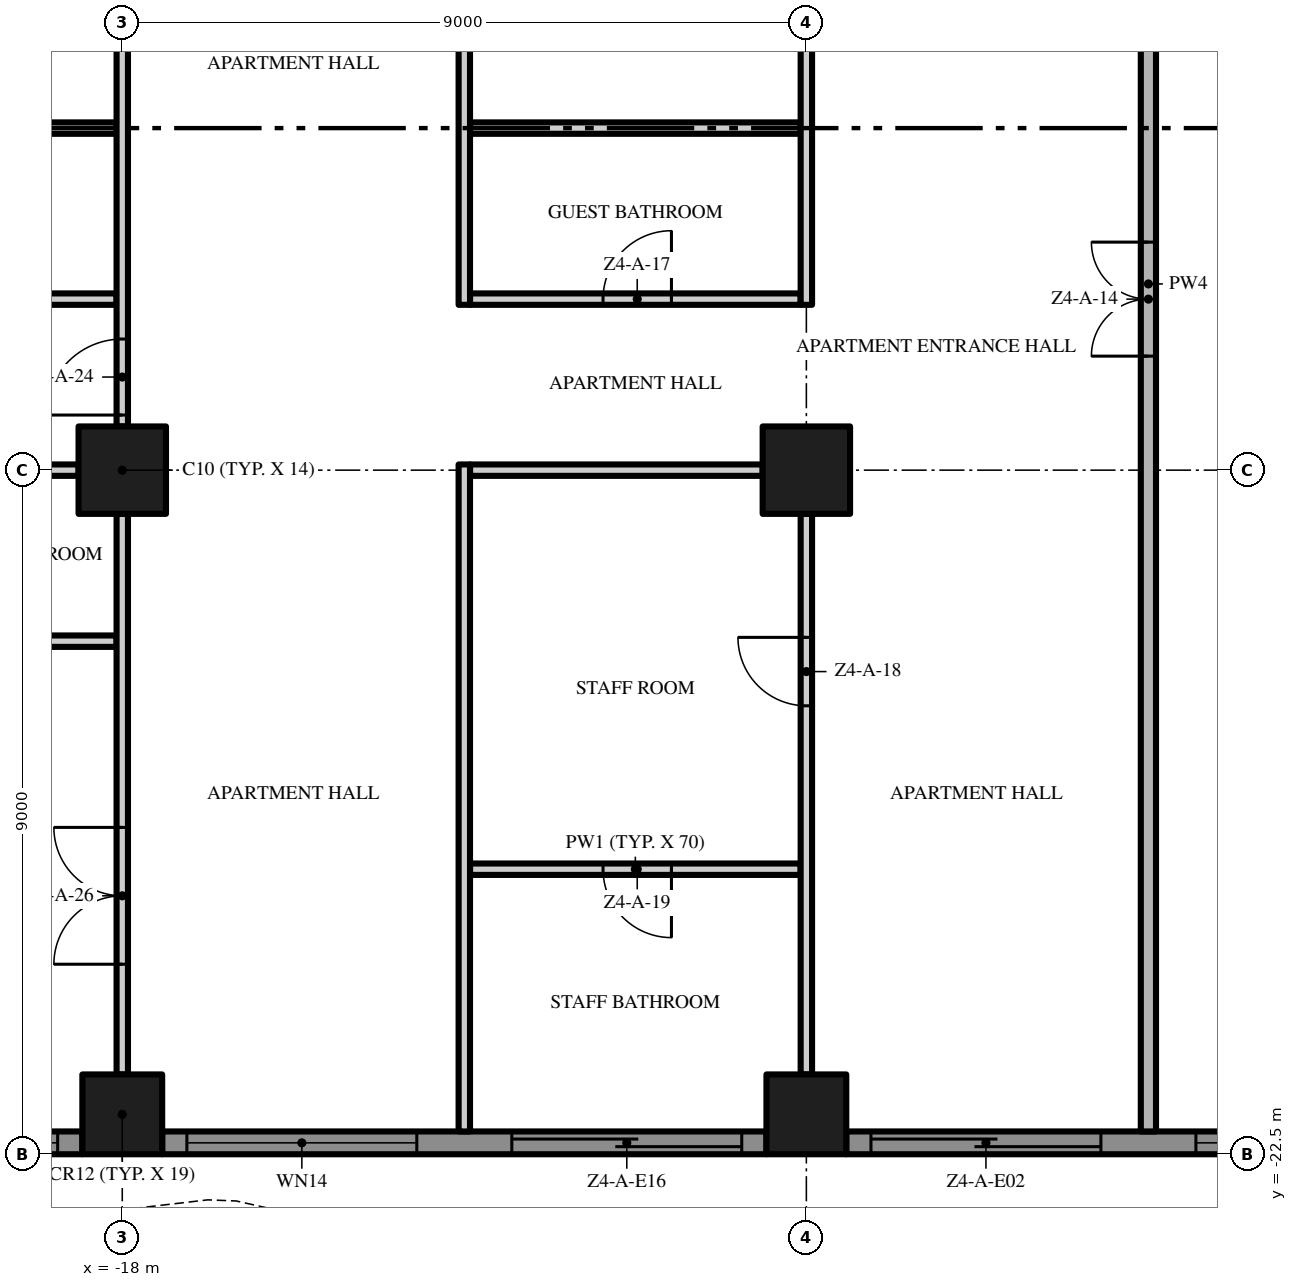
"""IFC4 building model, lengths in metres.
Left out: names, types, materials, properties, quantities, classifications, styles, units other than length and angle.
Written with IfcOpenShell. Run it as: python <this file> out.ifc"""

import sys

from ifc_helpers import new_model, si_unit, direction, frame, frame_2d, origin, origin_2d, place, context, subcontext, project, spatial, polyline, rectangle, outline, extrude, element, fill, save


model = new_model("IFC4")
c1 = context("Model", 3, precision=1e-05, world=origin(), true_north=direction((0.0, 1.0)))
c2 = subcontext(c1, "Body", "Model", "MODEL_VIEW")
j1 = project(units=[si_unit("LENGTHUNIT", "METRE"), si_unit("PLANEANGLEUNIT", "RADIAN")], contexts=[c1])
p1 = place(None, origin())
s1 = spatial("IfcSite", under=j1, at=p1, CompositionType="ELEMENT")
p2 = place(p1, origin())
s2 = spatial("IfcBuilding", under=s1, at=p2, CompositionType="ELEMENT")
p3 = place(p2, frame((0.0, 0.0, 192.0)))
s3 = spatial("IfcBuildingStorey", under=s2, at=p3, CompositionType="ELEMENT", Elevation=192.0)
p4 = place(p3, frame((-18.0, -13.5, 0.0), z_axis=(0.0, 0.0, 1.0), x_axis=(1.0, 0.0, 0.0)))
e1 = element("IfcColumn", 1, at=p4, inside=s3, PredefinedType="COLUMN", context=c2, shape_type="SweptSolid", body=[
    extrude(rectangle(XDim=1.15, YDim=1.15, at=origin_2d()), origin(), (0.0, 0.0, 1.0), 3.5),
])
p5 = place(p3, frame((-18.0, -21.975, 0.0), z_axis=(0.0, 0.0, 1.0), x_axis=(1.0, 0.0, 0.0)))
e2 = element("IfcColumn", 2, at=p5, inside=s3, PredefinedType="COLUMN", context=c2, shape_type="SweptSolid", body=[
    extrude(rectangle(XDim=1.05, YDim=1.05, at=origin_2d()), origin(), (0.0, 0.0, 1.0), 3.5),
])
p6 = place(p3, frame((-9.0, -13.5, 0.0), z_axis=(0.0, 0.0, 1.0), x_axis=(1.0, 0.0, 0.0)))
e3 = element("IfcColumn", 3, at=p6, inside=s3, PredefinedType="COLUMN", context=c2, shape_type="SweptSolid", body=[
    extrude(rectangle(XDim=1.15, YDim=1.15, at=origin_2d()), origin(), (0.0, 0.0, 1.0), 3.5),
])
p7 = place(p3, frame((-9.0, -21.975, 0.0), z_axis=(0.0, 0.0, 1.0), x_axis=(1.0, 0.0, 0.0)))
e4 = element("IfcColumn", 4, at=p7, inside=s3, PredefinedType="COLUMN", context=c2, shape_type="SweptSolid", body=[
    extrude(rectangle(XDim=1.05, YDim=1.05, at=origin_2d()), origin(), (0.0, 0.0, 1.0), 3.5),
])
p8 = place(p3, frame((-18.525, -22.35, 0.0), z_axis=(0.0, 0.0, 1.0), x_axis=(-1.0, 0.0, 0.0)))
e5 = element("IfcWall", 5, at=p8, inside=s3, PredefinedType="SOLIDWALL", context=c2, shape_type="SweptSolid", body=[
    extrude(rectangle(XDim=3.675, YDim=0.3, at=frame_2d((1.837, 0.0))), origin(), (0.0, 0.0, 1.0), 3.5),
])
p9 = place(p8, frame((0.325, 0.0, 0.45)))
e6 = element("IfcOpeningElement", 6, at=p9, cuts=e5, PredefinedType="OPENING", context=c2, shape_type="SweptSolid", body=[
    extrude(rectangle(XDim=3.025, YDim=2.65, at=frame_2d((1.512, 1.325))), frame((0.0, 0.16, 0.0), z_axis=(0.0, -1.0, 0.0), x_axis=(1.0, 0.0, 0.0)), (0.0, 0.0, 1.0), 0.32),
])
p10 = place(p3, frame((-9.525, -22.35, 0.0), z_axis=(0.0, 0.0, 1.0), x_axis=(-1.0, 0.0, 0.0)))
e7 = element("IfcWall", 7, at=p10, inside=s3, PredefinedType="SOLIDWALL", context=c2, shape_type="SweptSolid", body=[
    extrude(rectangle(XDim=7.95, YDim=0.3, at=frame_2d((3.975, 0.0))), origin(), (0.0, 0.0, 1.0), 3.5),
])
p11 = place(p10, frame((4.6, 0.0, 0.45)))
e8 = element("IfcOpeningElement", 8, at=p11, cuts=e7, PredefinedType="OPENING", context=c2, shape_type="SweptSolid", body=[
    extrude(rectangle(XDim=3.025, YDim=2.65, at=frame_2d((1.512, 1.325))), frame((0.0, 0.16, 0.0), z_axis=(0.0, -1.0, 0.0), x_axis=(1.0, 0.0, 0.0)), (0.0, 0.0, 1.0), 0.32),
])
p12 = place(p10, frame((0.325, 0.0, 0.0)))
e9 = element("IfcOpeningElement", 9, at=p12, cuts=e7, PredefinedType="OPENING", context=c2, shape_type="SweptSolid", body=[
    extrude(rectangle(XDim=3.025, YDim=2.4, at=frame_2d((1.512, 1.2))), frame((0.0, 0.16, 0.0), z_axis=(0.0, -1.0, 0.0), x_axis=(1.0, 0.0, 0.0)), (0.0, 0.0, 1.0), 0.32),
])
p13 = place(p3, frame((-0.525, -22.35, 0.0), z_axis=(0.0, 0.0, 1.0), x_axis=(-1.0, 0.0, 0.0)))
e10 = element("IfcWall", 10, at=p13, inside=s3, PredefinedType="SOLIDWALL", context=c2, shape_type="SweptSolid", body=[
    extrude(rectangle(XDim=7.95, YDim=0.3, at=frame_2d((3.975, 0.0))), origin(), (0.0, 0.0, 1.0), 3.5),
])
p14 = place(p13, frame((4.6, 0.0, 0.0)))
e11 = element("IfcOpeningElement", 11, at=p14, cuts=e10, PredefinedType="OPENING", context=c2, shape_type="SweptSolid", body=[
    extrude(rectangle(XDim=3.025, YDim=2.4, at=frame_2d((1.512, 1.2))), frame((0.0, 0.16, 0.0), z_axis=(0.0, -1.0, 0.0), x_axis=(1.0, 0.0, 0.0)), (0.0, 0.0, 1.0), 0.32),
])
p15 = place(p13, frame((0.325, 0.0, 0.45)))
e12 = element("IfcOpeningElement", 12, at=p15, cuts=e10, PredefinedType="OPENING", context=c2, shape_type="SweptSolid", body=[
    extrude(rectangle(XDim=3.025, YDim=2.65, at=frame_2d((1.512, 1.325))), frame((0.0, 0.16, 0.0), z_axis=(0.0, -1.0, 0.0), x_axis=(1.0, 0.0, 0.0)), (0.0, 0.0, 1.0), 0.32),
])
p16 = place(p3, origin())
e13 = element("IfcWall", 13, at=p16, inside=s3, PredefinedType="USERDEFINED", context=c2, shape_type="SweptSolid", body=[
    extrude(outline(polyline([(-22.5, -25.149), (-21.0, -24.488), (-19.5, -23.755), (-18.0, -23.231), (-16.875, -23.1), (-16.5, -23.115), (-15.0, -23.451), (-13.5, -24.112), (-12.0, -24.845), (-10.5, -25.369), (-9.375, -25.5), (-9.0, -25.485), (-7.5, -25.149), (-6.0, -24.488), (-4.5, -23.755), (-3.0, -23.231), (-1.875, -23.1), (-1.5, -23.115), (0.0, -23.451), (1.5, -24.112), (3.0, -24.845), (4.5, -25.369), (5.625, -25.5), (6.0, -25.485), (7.5, -25.149), (9.0, -24.488), (10.5, -23.755), (12.0, -23.231), (13.125, -23.1), (13.5, -23.115), (15.0, -23.451), (16.5, -24.112), (18.0, -24.845), (19.5, -25.369), (20.625, -25.5), (21.0, -25.485), (22.5, -25.149), (22.445, -24.905), (20.967, -25.236), (20.635, -25.249), (19.556, -25.124), (18.096, -24.614), (16.605, -23.885), (15.079, -23.213), (13.533, -22.866), (13.115, -22.849), (11.944, -22.986), (10.404, -23.524), (8.895, -24.261), (7.421, -24.91), (5.967, -25.236), (5.635, -25.249), (4.556, -25.124), (3.096, -24.614), (1.605, -23.885), (0.079, -23.213), (-1.467, -22.866), (-1.885, -22.849), (-3.056, -22.986), (-4.596, -23.524), (-6.105, -24.261), (-7.579, -24.91), (-9.033, -25.236), (-9.365, -25.249), (-10.444, -25.124), (-11.904, -24.614), (-13.395, -23.885), (-14.921, -23.213), (-16.467, -22.866), (-16.885, -22.849), (-18.056, -22.986), (-19.596, -23.524), (-21.105, -24.261), (-22.601, -24.92), (-22.5, -25.149)])), origin(), (0.0, 0.0, 1.0), 0.9),
])
p17 = place(p3, frame((-9.075, -18.75, 0.0), z_axis=(0.0, 0.0, 1.0), x_axis=(-1.0, 0.0, 0.0)))
e14 = element("IfcWall", 14, at=p17, inside=s3, PredefinedType="PARTITIONING", context=c2, shape_type="SweptSolid", body=[
    extrude(rectangle(XDim=4.35, YDim=0.15, at=frame_2d((2.175, 0.0))), origin(), (0.0, 0.0, 1.0), 3.5),
])
p18 = place(p17, frame((1.7, 0.0, 0.0)))
e15 = element("IfcOpeningElement", 15, at=p18, cuts=e14, PredefinedType="OPENING", context=c2, shape_type="SweptSolid", body=[
    extrude(rectangle(XDim=0.9, YDim=2.1, at=frame_2d((0.45, 1.05))), frame((0.0, 0.085, 0.0), z_axis=(0.0, -1.0, 0.0), x_axis=(1.0, 0.0, 0.0)), (0.0, 0.0, 1.0), 0.17),
])
p19 = place(p3, frame((-20.925, -15.75, 0.0), z_axis=(0.0, 0.0, 1.0), x_axis=(1.0, 0.0, 0.0)))
e16 = element("IfcWall", 16, at=p19, inside=s3, PredefinedType="PARTITIONING", context=c2, shape_type="SweptSolid", body=[
    extrude(rectangle(XDim=2.85, YDim=0.15, at=frame_2d((1.425, 0.0))), origin(), (0.0, 0.0, 1.0), 3.5),
])
p20 = place(p3, frame((-25.95, -13.5, 0.0), z_axis=(0.0, 0.0, 1.0), x_axis=(1.0, 0.0, 0.0)))
e17 = element("IfcWall", 17, at=p20, inside=s3, PredefinedType="PARTITIONING", context=c2, shape_type="SweptSolid", body=[
    extrude(rectangle(XDim=7.375, YDim=0.15, at=frame_2d((3.688, 0.0))), origin(), (0.0, 0.0, 1.0), 3.5),
])
p21 = place(p3, frame((-13.425, -13.5, 0.0), z_axis=(0.0, 0.0, 1.0), x_axis=(1.0, 0.0, 0.0)))
e18 = element("IfcWall", 18, at=p21, inside=s3, PredefinedType="PARTITIONING", context=c2, shape_type="SweptSolid", body=[
    extrude(rectangle(XDim=3.85, YDim=0.15, at=frame_2d((1.925, 0.0))), origin(), (0.0, 0.0, 1.0), 3.5),
])
p22 = place(p3, frame((-20.925, -11.25, 0.0), z_axis=(0.0, 0.0, 1.0), x_axis=(1.0, 0.0, 0.0)))
e19 = element("IfcWall", 19, at=p22, inside=s3, PredefinedType="PARTITIONING", context=c2, shape_type="SweptSolid", body=[
    extrude(rectangle(XDim=2.85, YDim=0.15, at=frame_2d((1.425, 0.0))), origin(), (0.0, 0.0, 1.0), 3.5),
])
p23 = place(p3, frame((-13.425, -11.25, 0.0), z_axis=(0.0, 0.0, 1.0), x_axis=(1.0, 0.0, 0.0)))
e20 = element("IfcWall", 20, at=p23, inside=s3, PredefinedType="PARTITIONING", context=c2, shape_type="SweptSolid", body=[
    extrude(rectangle(XDim=4.35, YDim=0.15, at=frame_2d((2.175, 0.0))), origin(), (0.0, 0.0, 1.0), 3.5),
])
p24 = place(p23, frame((1.75, 0.0, 0.0)))
e21 = element("IfcOpeningElement", 21, at=p24, cuts=e20, PredefinedType="OPENING", context=c2, shape_type="SweptSolid", body=[
    extrude(rectangle(XDim=0.9, YDim=2.1, at=frame_2d((0.45, 1.05))), frame((0.0, 0.085, 0.0), z_axis=(0.0, -1.0, 0.0), x_axis=(1.0, 0.0, 0.0)), (0.0, 0.0, 1.0), 0.17),
])
p25 = place(p3, frame((-20.925, -9.0, 0.0), z_axis=(0.0, 0.0, 1.0), x_axis=(1.0, 0.0, 0.0)))
e22 = element("IfcWall", 22, at=p25, inside=s3, PredefinedType="PARTITIONING", context=c2, shape_type="SweptSolid", body=[
    extrude(rectangle(XDim=2.85, YDim=0.15, at=frame_2d((1.425, 0.0))), origin(), (0.0, 0.0, 1.0), 3.5),
])
p26 = place(p3, frame((-13.425, -9.0, 0.0), z_axis=(0.0, 0.0, 1.0), x_axis=(1.0, 0.0, 0.0)))
e23 = element("IfcWall", 23, at=p26, inside=s3, PredefinedType="PARTITIONING", context=c2, shape_type="SweptSolid", body=[
    extrude(rectangle(XDim=4.35, YDim=0.15, at=frame_2d((2.175, 0.0))), origin(), (0.0, 0.0, 1.0), 3.5),
])
p27 = place(p3, frame((-18.0, -21.45, 0.0), z_axis=(0.0, 0.0, 1.0), x_axis=(0.0, 1.0, 0.0)))
e24 = element("IfcWall", 24, at=p27, inside=s3, PredefinedType="PARTITIONING", context=c2, shape_type="SweptSolid", body=[
    extrude(rectangle(XDim=7.375, YDim=0.15, at=frame_2d((3.688, 0.0))), origin(), (0.0, 0.0, 1.0), 3.5),
])
p28 = place(p27, frame((1.45, 0.0, 0.0)))
e25 = element("IfcOpeningElement", 25, at=p28, cuts=e24, PredefinedType="OPENING", context=c2, shape_type="SweptSolid", body=[
    extrude(rectangle(XDim=1.8, YDim=2.4, at=frame_2d((0.9, 1.2))), frame((0.0, 0.085, 0.0), z_axis=(0.0, -1.0, 0.0), x_axis=(1.0, 0.0, 0.0)), (0.0, 0.0, 1.0), 0.17),
])
p29 = place(p3, frame((-18.0, -12.925, 0.0), z_axis=(0.0, 0.0, 1.0), x_axis=(0.0, 1.0, 0.0)))
e26 = element("IfcWall", 26, at=p29, inside=s3, PredefinedType="PARTITIONING", context=c2, shape_type="SweptSolid", body=[
    extrude(rectangle(XDim=7.85, YDim=0.15, at=frame_2d((3.925, 0.0))), origin(), (0.0, 0.0, 1.0), 3.5),
])
p30 = place(p29, frame((6.7, 0.0, 0.0)))
e27 = element("IfcOpeningElement", 27, at=p30, cuts=e26, PredefinedType="OPENING", context=c2, shape_type="SweptSolid", body=[
    extrude(rectangle(XDim=1.0, YDim=2.4, at=frame_2d((0.5, 1.2))), frame((0.0, 0.085, 0.0), z_axis=(0.0, -1.0, 0.0), x_axis=(1.0, 0.0, 0.0)), (0.0, 0.0, 1.0), 0.17),
])
p31 = place(p29, frame((0.15, 0.0, 0.0)))
e28 = element("IfcOpeningElement", 28, at=p31, cuts=e26, PredefinedType="OPENING", context=c2, shape_type="SweptSolid", body=[
    extrude(rectangle(XDim=1.0, YDim=2.4, at=frame_2d((0.5, 1.2))), frame((0.0, 0.085, 0.0), z_axis=(0.0, -1.0, 0.0), x_axis=(1.0, 0.0, 0.0)), (0.0, 0.0, 1.0), 0.17),
])
p32 = place(p3, frame((-13.5, -22.2, 0.0), z_axis=(0.0, 0.0, 1.0), x_axis=(0.0, 1.0, 0.0)))
e29 = element("IfcWall", 29, at=p32, inside=s3, PredefinedType="PARTITIONING", context=c2, shape_type="SweptSolid", body=[
    extrude(rectangle(XDim=8.775, YDim=0.15, at=frame_2d((4.388, 0.0))), origin(), (0.0, 0.0, 1.0), 3.5),
])
p33 = place(p3, frame((-13.5, -11.325, 0.0), z_axis=(0.0, 0.0, 1.0), x_axis=(0.0, 1.0, 0.0)))
e30 = element("IfcWall", 30, at=p33, inside=s3, PredefinedType="PARTITIONING", context=c2, shape_type="SweptSolid", body=[
    extrude(rectangle(XDim=11.225, YDim=0.15, at=frame_2d((5.612, 0.0))), origin(), (0.0, 0.0, 1.0), 3.5),
])
p34 = place(p3, frame((-9.0, -21.45, 0.0), z_axis=(0.0, 0.0, 1.0), x_axis=(0.0, 1.0, 0.0)))
e31 = element("IfcWall", 31, at=p34, inside=s3, PredefinedType="PARTITIONING", context=c2, shape_type="SweptSolid", body=[
    extrude(rectangle(XDim=7.375, YDim=0.15, at=frame_2d((3.688, 0.0))), origin(), (0.0, 0.0, 1.0), 3.5),
])
p35 = place(p34, frame((4.85, 0.0, 0.0)))
e32 = element("IfcOpeningElement", 32, at=p35, cuts=e31, PredefinedType="OPENING", context=c2, shape_type="SweptSolid", body=[
    extrude(rectangle(XDim=0.9, YDim=2.1, at=frame_2d((0.45, 1.05))), frame((0.0, 0.085, 0.0), z_axis=(0.0, -1.0, 0.0), x_axis=(1.0, 0.0, 0.0)), (0.0, 0.0, 1.0), 0.17),
])
p36 = place(p3, frame((-9.0, -11.325, 0.0), z_axis=(0.0, 0.0, 1.0), x_axis=(0.0, 1.0, 0.0)))
e33 = element("IfcWall", 33, at=p36, inside=s3, PredefinedType="PARTITIONING", context=c2, shape_type="SweptSolid", body=[
    extrude(rectangle(XDim=6.25, YDim=0.15, at=frame_2d((3.125, 0.0))), origin(), (0.0, 0.0, 1.0), 3.5),
])
p37 = place(p36, frame((4.825, 0.0, 0.0)))
e34 = element("IfcOpeningElement", 34, at=p37, cuts=e33, PredefinedType="OPENING", context=c2, shape_type="SweptSolid", body=[
    extrude(rectangle(XDim=1.0, YDim=2.4, at=frame_2d((0.5, 1.2))), frame((0.0, 0.085, 0.0), z_axis=(0.0, -1.0, 0.0), x_axis=(1.0, 0.0, 0.0)), (0.0, 0.0, 1.0), 0.17),
])
p38 = place(p3, frame((-4.5, -22.2, 0.0), z_axis=(0.0, 0.0, 1.0), x_axis=(0.0, 1.0, 0.0)))
e35 = element("IfcWall", 35, at=p38, inside=s3, PredefinedType="PARTITIONING", context=c2, shape_type="SweptSolid", body=[
    extrude(rectangle(XDim=22.3, YDim=0.2, at=frame_2d((11.15, 0.0))), origin(), (0.0, 0.0, 1.0), 3.5),
])
p39 = place(p38, frame((10.2, 0.0, 0.0)))
e36 = element("IfcOpeningElement", 36, at=p39, cuts=e35, PredefinedType="OPENING", context=c2, shape_type="SweptSolid", body=[
    extrude(rectangle(XDim=1.5, YDim=2.4, at=frame_2d((0.75, 1.2))), frame((0.0, 0.11, 0.0), z_axis=(0.0, -1.0, 0.0), x_axis=(1.0, 0.0, 0.0)), (0.0, 0.0, 1.0), 0.22),
])
p40 = place(p9, origin())
e37 = element("IfcWindow", 37, at=p40, inside=s3, PartitioningType="SINGLE_PANEL", PredefinedType="WINDOW", context=c2, shape_type="SweptSolid", body=[
    extrude(rectangle(XDim=3.025, YDim=2.65, at=frame_2d((1.512, 1.325))), frame((0.0, 0.03, 0.0), z_axis=(0.0, -1.0, 0.0), x_axis=(1.0, 0.0, 0.0)), (0.0, 0.0, 1.0), 0.06),
])
fill(e6, e37)
p41 = place(p11, origin())
e38 = element("IfcWindow", 38, at=p41, inside=s3, PartitioningType="SINGLE_PANEL", PredefinedType="WINDOW", context=c2, shape_type="SweptSolid", body=[
    extrude(rectangle(XDim=3.025, YDim=2.65, at=frame_2d((1.512, 1.325))), frame((0.0, 0.03, 0.0), z_axis=(0.0, -1.0, 0.0), x_axis=(1.0, 0.0, 0.0)), (0.0, 0.0, 1.0), 0.06),
])
fill(e8, e38)
p42 = place(p12, origin())
e39 = element("IfcDoor", 39, at=p42, inside=s3, OperationType="SINGLE_SWING_LEFT", PredefinedType="DOOR", context=c2, shape_type="SweptSolid", body=[
    extrude(rectangle(XDim=3.025, YDim=2.4, at=frame_2d((1.512, 1.2))), frame((0.0, 0.025, 0.0), z_axis=(0.0, -1.0, 0.0), x_axis=(1.0, 0.0, 0.0)), (0.0, 0.0, 1.0), 0.05),
])
fill(e9, e39)
p43 = place(p14, origin())
e40 = element("IfcDoor", 40, at=p43, inside=s3, OperationType="SINGLE_SWING_LEFT", PredefinedType="DOOR", context=c2, shape_type="SweptSolid", body=[
    extrude(rectangle(XDim=3.025, YDim=2.4, at=frame_2d((1.512, 1.2))), frame((0.0, 0.025, 0.0), z_axis=(0.0, -1.0, 0.0), x_axis=(1.0, 0.0, 0.0)), (0.0, 0.0, 1.0), 0.05),
])
fill(e11, e40)
p44 = place(p15, origin())
e41 = element("IfcWindow", 41, at=p44, inside=s3, PartitioningType="SINGLE_PANEL", PredefinedType="WINDOW", context=c2, shape_type="SweptSolid", body=[
    extrude(rectangle(XDim=3.025, YDim=2.65, at=frame_2d((1.512, 1.325))), frame((0.0, 0.03, 0.0), z_axis=(0.0, -1.0, 0.0), x_axis=(1.0, 0.0, 0.0)), (0.0, 0.0, 1.0), 0.06),
])
fill(e12, e41)
p45 = place(p39, origin())
e42 = element("IfcDoor", 42, at=p45, inside=s3, OperationType="DOUBLE_DOOR_SINGLE_SWING", PredefinedType="DOOR", context=c2, shape_type="SweptSolid", body=[
    extrude(rectangle(XDim=1.5, YDim=2.4, at=frame_2d((0.75, 1.2))), frame((0.0, 0.025, 0.0), z_axis=(0.0, -1.0, 0.0), x_axis=(1.0, 0.0, 0.0)), (0.0, 0.0, 1.0), 0.05),
])
fill(e36, e42)
p46 = place(p24, origin())
e43 = element("IfcDoor", 43, at=p46, inside=s3, OperationType="SINGLE_SWING_RIGHT", PredefinedType="DOOR", context=c2, shape_type="SweptSolid", body=[
    extrude(rectangle(XDim=0.9, YDim=2.1, at=frame_2d((0.45, 1.05))), frame((0.0, 0.025, 0.0), z_axis=(0.0, -1.0, 0.0), x_axis=(1.0, 0.0, 0.0)), (0.0, 0.0, 1.0), 0.05),
])
fill(e21, e43)
p47 = place(p35, origin())
e44 = element("IfcDoor", 44, at=p47, inside=s3, OperationType="SINGLE_SWING_RIGHT", PredefinedType="DOOR", context=c2, shape_type="SweptSolid", body=[
    extrude(rectangle(XDim=0.9, YDim=2.1, at=frame_2d((0.45, 1.05))), frame((0.0, 0.025, 0.0), z_axis=(0.0, -1.0, 0.0), x_axis=(1.0, 0.0, 0.0)), (0.0, 0.0, 1.0), 0.05),
])
fill(e32, e44)
p48 = place(p18, origin())
e45 = element("IfcDoor", 45, at=p48, inside=s3, OperationType="SINGLE_SWING_LEFT", PredefinedType="DOOR", context=c2, shape_type="SweptSolid", body=[
    extrude(rectangle(XDim=0.9, YDim=2.1, at=frame_2d((0.45, 1.05))), frame((0.0, 0.025, 0.0), z_axis=(0.0, -1.0, 0.0), x_axis=(1.0, 0.0, 0.0)), (0.0, 0.0, 1.0), 0.05),
])
fill(e15, e45)
p49 = place(p31, origin())
e46 = element("IfcDoor", 46, at=p49, inside=s3, OperationType="SINGLE_SWING_LEFT", PredefinedType="DOOR", context=c2, shape_type="SweptSolid", body=[
    extrude(rectangle(XDim=1.0, YDim=2.4, at=frame_2d((0.5, 1.2))), frame((0.0, 0.025, 0.0), z_axis=(0.0, -1.0, 0.0), x_axis=(1.0, 0.0, 0.0)), (0.0, 0.0, 1.0), 0.05),
])
fill(e28, e46)
p50 = place(p28, origin())
e47 = element("IfcDoor", 47, at=p50, inside=s3, OperationType="DOUBLE_DOOR_SINGLE_SWING", PredefinedType="DOOR", context=c2, shape_type="SweptSolid", body=[
    extrude(rectangle(XDim=1.8, YDim=2.4, at=frame_2d((0.9, 1.2))), frame((0.0, 0.025, 0.0), z_axis=(0.0, -1.0, 0.0), x_axis=(1.0, 0.0, 0.0)), (0.0, 0.0, 1.0), 0.05),
])
fill(e25, e47)
save(model, sys.argv[1])
